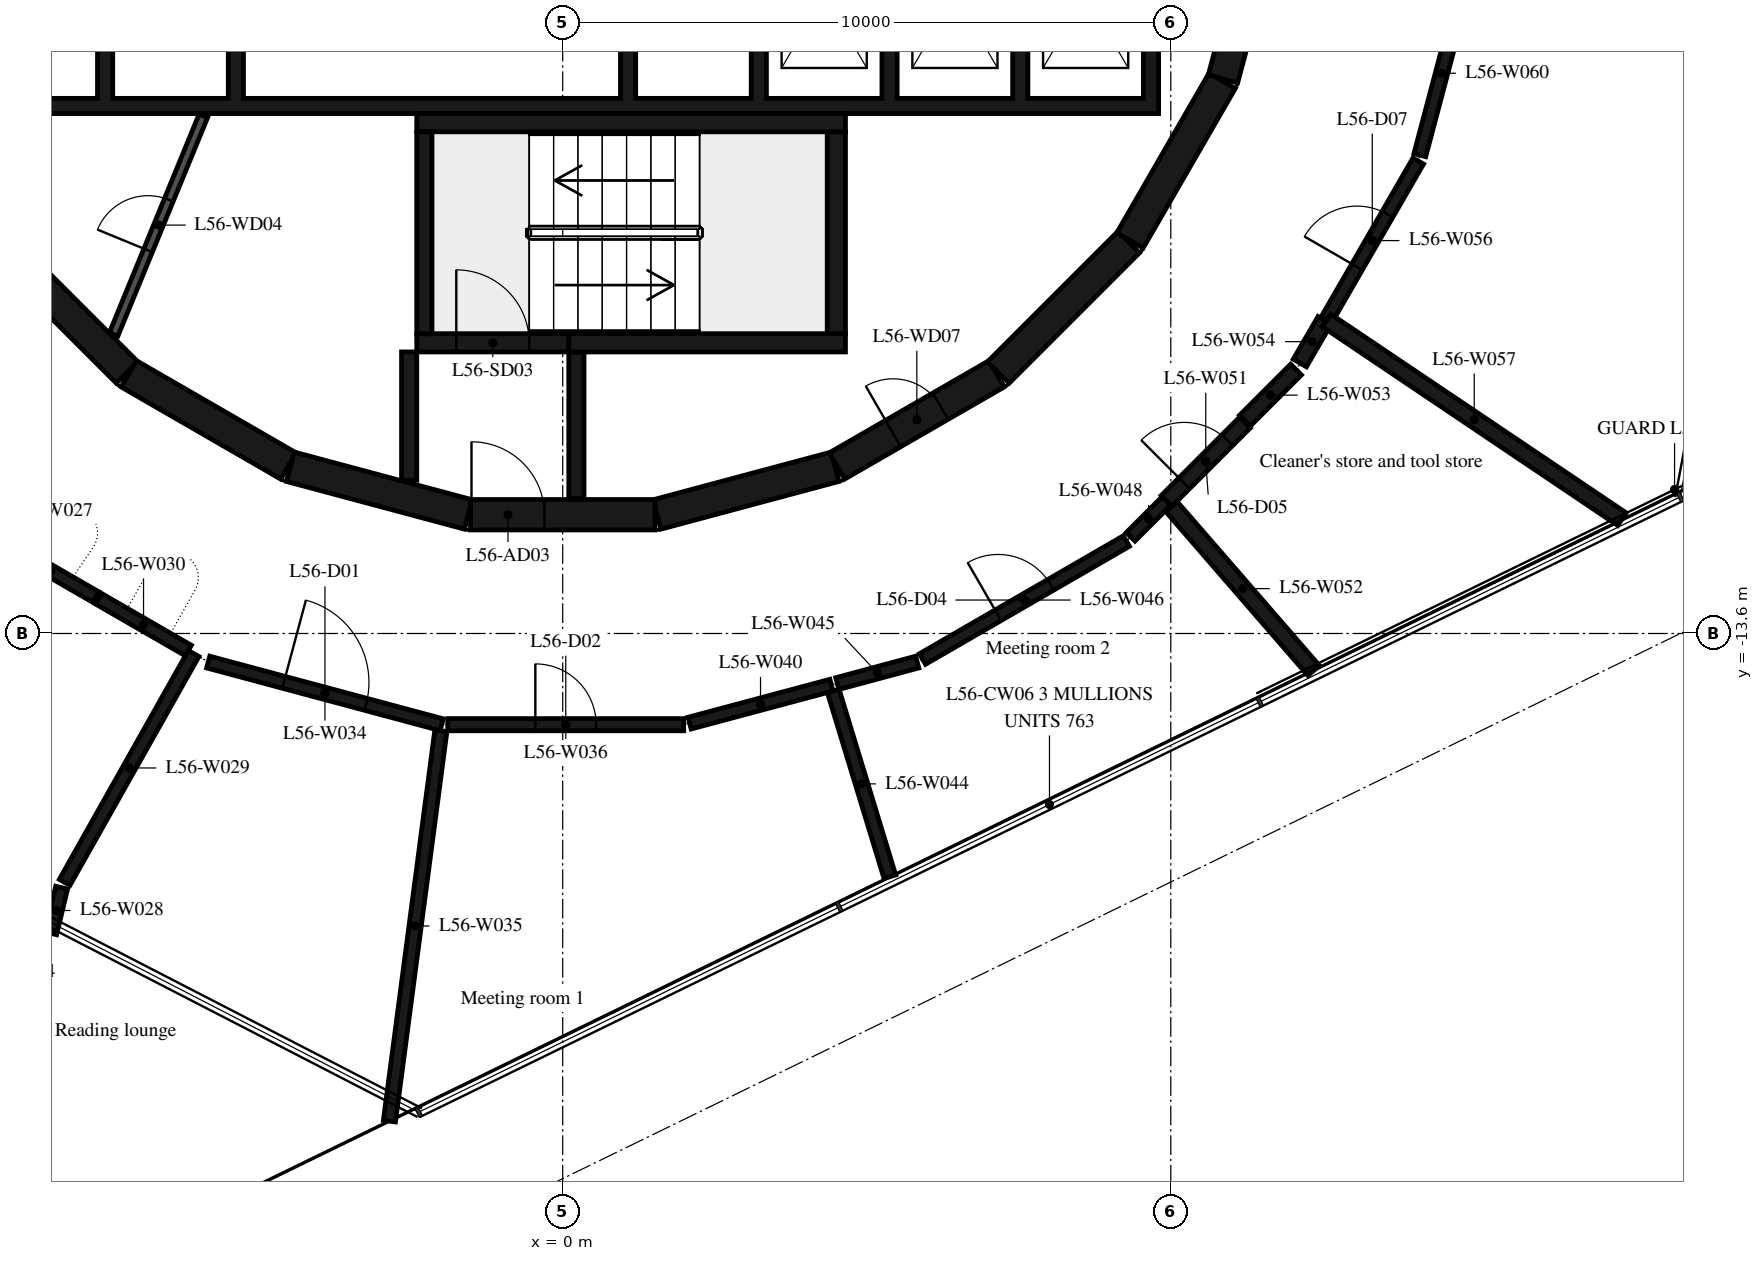
"""IFC4 building model, lengths in metres.
Left out: names, types, materials, properties, quantities, classifications, styles, units other than length and angle.
Written with IfcOpenShell. Run it as: python <this file> out.ifc"""

import sys

from ifc_helpers import new_model, si_unit, direction, frame, frame_2d, origin, place, context, subcontext, project, spatial, polyline, rectangle, outline, extrude, element, fill, save


model = new_model("IFC4")
c1 = context("Model", 3, precision=1e-05, world=origin(), true_north=direction((0.0, 1.0)))
c2 = subcontext(c1, "Body", "Model", "MODEL_VIEW")
j1 = project(units=[si_unit("LENGTHUNIT", "METRE"), si_unit("PLANEANGLEUNIT", "RADIAN")], contexts=[c1])
p1 = place(None, origin())
s1 = spatial("IfcSite", under=j1, at=p1, CompositionType="ELEMENT")
p2 = place(p1, origin())
s2 = spatial("IfcBuilding", under=s1, at=p2, CompositionType="ELEMENT")
p3 = place(p2, frame((0.0, 0.0, 219.9)))
s3 = spatial("IfcBuildingStorey", under=s2, at=p3, CompositionType="ELEMENT", Elevation=219.9)
p4 = place(p3, frame((1.55, -11.643, 0.0), z_axis=(0.0, 0.0, 1.0), x_axis=(0.965948410781, 0.258734743916, 0.0)))
e1 = element("IfcWall", 1, at=p4, inside=s3, PredefinedType="SHEAR", context=c2, shape_type="SweptSolid", body=[
    extrude(rectangle(XDim=3.033, YDim=0.5, at=frame_2d((1.516, 0.0))), origin(), (0.0, 0.0, 1.0), 6.35),
])
p5 = place(p3, frame((4.51, -10.845, 0.0), z_axis=(0.0, 0.0, 1.0), x_axis=(0.865975092491, 0.500087131594, 0.0)))
e2 = element("IfcWall", 2, at=p5, inside=s3, PredefinedType="SHEAR", context=c2, shape_type="SweptSolid", body=[
    extrude(rectangle(XDim=3.033, YDim=0.5, at=frame_2d((1.516, 0.0))), origin(), (0.0, 0.0, 1.0), 6.35),
])
p6 = place(p5, frame((1.066, 0.0, 0.0)))
e3 = element("IfcOpeningElement", 3, at=p6, cuts=e2, PredefinedType="OPENING", context=c2, shape_type="SweptSolid", body=[
    extrude(rectangle(XDim=0.9, YDim=2.1, at=frame_2d((0.45, 1.05))), frame((0.0, 0.26, 0.0), z_axis=(0.0, -1.0, 0.0), x_axis=(1.0, 0.0, 0.0)), (0.0, 0.0, 1.0), 0.52),
])
p7 = place(p3, frame((7.164, -9.308, 0.0), z_axis=(0.0, 0.0, 1.0), x_axis=(0.707106781187, 0.707106781187, 0.0)))
e4 = element("IfcWall", 4, at=p7, inside=s3, PredefinedType="SHEAR", context=c2, shape_type="SweptSolid", body=[
    extrude(rectangle(XDim=3.032, YDim=0.5, at=frame_2d((1.516, 0.0))), origin(), (0.0, 0.0, 1.0), 6.35),
])
for number, where, z_axis, x_axis in (
    (5, (9.329, -7.137, 0.0), (0.0, 0.0, 1.0), (0.5, 0.866, 0.0)),
    (6, (10.858, -4.479, 0.0), (0.0, 0.0, 1.0), (0.259, 0.966, 0.0)),
):
    element("IfcWall", number, at=place(p3, frame(where, z_axis=z_axis, x_axis=x_axis)), inside=s3, PredefinedType="SHEAR", context=c2, shape_type="SweptSolid", body=[
        extrude(rectangle(XDim=3.033, YDim=0.5, at=frame_2d((1.516, 0.0))), origin(), (0.0, 0.0, 1.0), 6.35),
    ])
p8 = place(p3, frame((-9.308, -7.164, 0.0), z_axis=(0.0, 0.0, 1.0), x_axis=(0.707106781187, -0.707106781187, 0.0)))
e7 = element("IfcWall", 7, at=p8, inside=s3, PredefinedType="SHEAR", context=c2, shape_type="SweptSolid", body=[
    extrude(rectangle(XDim=3.032, YDim=0.5, at=frame_2d((1.516, 0.0))), origin(), (0.0, 0.0, 1.0), 6.35),
])
for number, where, z_axis, x_axis in (
    (8, (-7.137, -9.329, 0.0), (0.0, 0.0, 1.0), (0.866, -0.5, 0.0)),
    (9, (-4.479, -10.858, 0.0), (0.0, 0.0, 1.0), (0.966, -0.259, 0.0)),
):
    element("IfcWall", number, at=place(p3, frame(where, z_axis=z_axis, x_axis=x_axis)), inside=s3, PredefinedType="SHEAR", context=c2, shape_type="SweptSolid", body=[
        extrude(rectangle(XDim=3.033, YDim=0.5, at=frame_2d((1.516, 0.0))), origin(), (0.0, 0.0, 1.0), 6.35),
    ])
p9 = place(p3, frame((-1.516, -11.647, 0.0), z_axis=(0.0, 0.0, 1.0), x_axis=(1.0, 0.0, 0.0)))
e10 = element("IfcWall", 10, at=p9, inside=s3, PredefinedType="SHEAR", context=c2, shape_type="SweptSolid", body=[
    extrude(rectangle(XDim=3.033, YDim=0.5, at=frame_2d((1.516, 0.0))), origin(), (0.0, 0.0, 1.0), 6.35),
])
p10 = place(p9, frame((0.016, 0.0, 0.0)))
e11 = element("IfcOpeningElement", 11, at=p10, cuts=e10, PredefinedType="OPENING", context=c2, shape_type="SweptSolid", body=[
    extrude(rectangle(XDim=1.2, YDim=2.1, at=frame_2d((0.6, 1.05))), frame((0.0, 0.26, 0.0), z_axis=(0.0, -1.0, 0.0), x_axis=(1.0, 0.0, 0.0)), (0.0, 0.0, 1.0), 0.52),
])
p11 = place(p3, frame((-2.275, -8.67, 0.0), z_axis=(0.0, 0.0, 1.0), x_axis=(0.0, 1.0, 0.0)))
e12 = element("IfcWall", 12, at=p11, inside=s3, PredefinedType="SHEAR", context=c2, shape_type="SweptSolid", body=[
    extrude(rectangle(XDim=3.32, YDim=0.25, at=frame_2d((1.66, 0.0))), origin(), (0.0, 0.0, 1.0), 6.35),
])
p12 = place(p3, frame((-2.4, -5.2, 0.0), z_axis=(0.0, 0.0, 1.0), x_axis=(1.0, 0.0, 0.0)))
e13 = element("IfcWall", 13, at=p12, inside=s3, PredefinedType="SHEAR", context=c2, shape_type="SweptSolid", body=[
    extrude(rectangle(XDim=7.05, YDim=0.3, at=frame_2d((3.525, 0.0))), origin(), (0.0, 0.0, 1.0), 6.35),
])
p13 = place(p3, frame((4.5, -8.67, 0.0), z_axis=(0.0, 0.0, 1.0), x_axis=(0.0, 1.0, 0.0)))
e14 = element("IfcWall", 14, at=p13, inside=s3, PredefinedType="SHEAR", context=c2, shape_type="SweptSolid", body=[
    extrude(rectangle(XDim=3.32, YDim=0.3, at=frame_2d((1.66, 0.0))), origin(), (0.0, 0.0, 1.0), 6.35),
])
p14 = place(p3, frame((0.1, -8.82, 0.0), z_axis=(0.0, 0.0, 1.0), x_axis=(1.0, 0.0, 0.0)))
e15 = element("IfcWall", 15, at=p14, inside=s3, PredefinedType="SHEAR", context=c2, shape_type="SweptSolid", body=[
    extrude(rectangle(XDim=4.55, YDim=0.3, at=frame_2d((2.275, 0.0))), origin(), (0.0, 0.0, 1.0), 6.35),
])
p15 = place(p3, frame((-2.4, -8.82, 0.0), z_axis=(0.0, 0.0, 1.0), x_axis=(1.0, 0.0, 0.0)))
e16 = element("IfcWall", 16, at=p15, inside=s3, PredefinedType="SHEAR", context=c2, shape_type="SweptSolid", body=[
    extrude(rectangle(XDim=2.5, YDim=0.3, at=frame_2d((1.25, 0.0))), origin(), (0.0, 0.0, 1.0), 6.35),
])
p16 = place(p15, frame((0.65, 0.0, 0.0)))
e17 = element("IfcOpeningElement", 17, at=p16, cuts=e16, PredefinedType="OPENING", context=c2, shape_type="SweptSolid", body=[
    extrude(rectangle(XDim=1.2, YDim=2.1, at=frame_2d((0.6, 1.05))), frame((0.0, 0.16, 0.0), z_axis=(0.0, -1.0, 0.0), x_axis=(1.0, 0.0, 0.0)), (0.0, 0.0, 1.0), 0.32),
])
p17 = place(p3, frame((-2.525, -8.97, 0.0), z_axis=(0.0, 0.0, 1.0), x_axis=(0.0, -1.0, 0.0)))
e18 = element("IfcWall", 18, at=p17, inside=s3, PredefinedType="SHEAR", context=c2, shape_type="SweptSolid", body=[
    extrude(rectangle(XDim=2.11, YDim=0.25, at=frame_2d((1.055, 0.0))), origin(), (0.0, 0.0, 1.0), 6.35),
])
p18 = place(p3, frame((0.225, -8.97, 0.0), z_axis=(0.0, 0.0, 1.0), x_axis=(0.0, -1.0, 0.0)))
e19 = element("IfcWall", 19, at=p18, inside=s3, PredefinedType="SHEAR", context=c2, shape_type="SweptSolid", body=[
    extrude(rectangle(XDim=2.41, YDim=0.25, at=frame_2d((1.205, 0.0))), origin(), (0.0, 0.0, 1.0), 6.35),
])
p19 = place(p3, origin())
e20 = element("IfcWall", 20, at=p19, inside=s3, PredefinedType="SHEAR", context=c2, shape_type="SweptSolid", body=[
    extrude(outline(polyline([(9.8, -5.05), (9.8, -4.8), (9.8, -1.9), (9.55, -1.9), (9.55, -4.8), (7.65, -4.8), (7.65, -1.9), (7.4, -1.9), (7.4, -4.8), (5.5, -4.8), (5.5, -1.9), (5.25, -1.9), (5.25, -4.8), (3.35, -4.8), (3.35, -1.9), (3.1, -1.9), (3.1, -4.8), (1.2, -4.8), (1.2, -1.9), (0.95, -1.9), (0.95, -4.8), (-5.25, -4.8), (-5.25, -1.9), (-5.5, -1.9), (-5.5, -4.8), (-7.4, -4.8), (-7.4, -1.9), (-7.65, -1.9), (-7.65, -4.8), (-9.55, -4.8), (-9.55, -1.9), (-9.8, -1.9), (-9.8, -4.8), (-9.8, -5.05), (9.8, -5.05)])), origin(), (0.0, 0.0, 1.0), 6.35),
])
p20 = place(p3, frame((-7.385, -8.681, 0.0), z_axis=(0.0, 0.0, 1.0), x_axis=(0.379804590409, 0.925066739811, 0.0)))
e21 = element("IfcWall", 21, at=p20, inside=s3, PredefinedType="PARTITIONING", context=c2, shape_type="SweptSolid", body=[
    extrude(rectangle(XDim=3.885, YDim=0.15, at=frame_2d((1.942, 0.0))), origin(), (0.0, 0.0, 1.0), 6.35),
])
p21 = place(p20, frame((1.493, 0.0, 0.0)))
e22 = element("IfcOpeningElement", 22, at=p21, cuts=e21, PredefinedType="OPENING", context=c2, shape_type="SweptSolid", body=[
    extrude(rectangle(XDim=0.9, YDim=2.1, at=frame_2d((0.45, 1.05))), frame((0.0, 0.085, 0.0), z_axis=(0.0, -1.0, 0.0), x_axis=(1.0, 0.0, 0.0)), (0.0, 0.0, 1.0), 0.17),
])
p22 = place(p3, frame((-9.153, -12.15, 0.0), z_axis=(0.0, 0.0, 1.0), x_axis=(0.866168859652, -0.49975144479, 0.0)))
e23 = element("IfcWall", 23, at=p22, inside=s3, PredefinedType="PARTITIONING", context=c2, shape_type="SweptSolid", body=[
    extrude(rectangle(XDim=1.701, YDim=0.2, at=frame_2d((0.851, 0.0))), origin(), (0.0, 0.0, 1.0), 6.35),
])
p23 = place(p3, frame((-8.42, -18.53, 0.0), z_axis=(0.0, 0.0, 1.0), x_axis=(0.233289147823, 0.972407411278, 0.0)))
e24 = element("IfcWall", 24, at=p23, inside=s3, PredefinedType="PARTITIONING", context=c2, shape_type="SweptSolid", body=[
    extrude(rectangle(XDim=0.771, YDim=0.2, at=frame_2d((0.386, 0.0))), origin(), (0.0, 0.0, 1.0), 6.35),
])
p24 = place(p3, frame((-8.191, -17.693, 0.0), z_axis=(0.0, 0.0, 1.0), x_axis=(0.490999025193, 0.871160121481, 0.0)))
e25 = element("IfcWall", 25, at=p24, inside=s3, PredefinedType="PARTITIONING", context=c2, shape_type="SweptSolid", body=[
    extrude(rectangle(XDim=4.319, YDim=0.2, at=frame_2d((2.16, 0.0))), origin(), (0.0, 0.0, 1.0), 6.35),
])
p25 = place(p3, frame((-7.63, -13.03, 0.0), z_axis=(0.0, 0.0, 1.0), x_axis=(0.866133007568, -0.499813578448, 0.0)))
e26 = element("IfcWall", 26, at=p25, inside=s3, PredefinedType="PARTITIONING", context=c2, shape_type="SweptSolid", body=[
    extrude(rectangle(XDim=1.701, YDim=0.2, at=frame_2d((0.851, 0.0))), origin(), (0.0, 0.0, 1.0), 6.35),
])
p26 = place(p3, frame((-5.83, -14.07, 0.0), z_axis=(0.0, 0.0, 1.0), x_axis=(0.965857829358, -0.259072679895, 0.0)))
e27 = element("IfcWall", 27, at=p26, inside=s3, PredefinedType="PARTITIONING", context=c2, shape_type="SweptSolid", body=[
    extrude(rectangle(XDim=3.976, YDim=0.2, at=frame_2d((1.988, 0.0))), origin(), (0.0, 0.0, 1.0), 6.35),
])
p27 = place(p26, frame((1.288, 0.0, 0.0)))
e28 = element("IfcOpeningElement", 28, at=p27, cuts=e27, PredefinedType="OPENING", context=c2, shape_type="SweptSolid", body=[
    extrude(rectangle(XDim=1.4, YDim=2.1, at=frame_2d((0.7, 1.05))), frame((0.0, 0.11, 0.0), z_axis=(0.0, -1.0, 0.0), x_axis=(1.0, 0.0, 0.0)), (0.0, 0.0, 1.0), 0.22),
])
p28 = place(p3, frame((-2.003, -15.199, 0.0), z_axis=(0.0, 0.0, 1.0), x_axis=(-0.130768496526, -0.991412931284, 0.0)))
e29 = element("IfcWall", 29, at=p28, inside=s3, PredefinedType="PARTITIONING", context=c2, shape_type="SweptSolid", body=[
    extrude(rectangle(XDim=6.477, YDim=0.2, at=frame_2d((3.238, 0.0))), origin(), (0.0, 0.0, 1.0), 6.35),
])
p29 = place(p3, frame((-1.89, -15.1, 0.0), z_axis=(0.0, 0.0, 1.0), x_axis=(1.0, 0.0, 0.0)))
e30 = element("IfcWall", 30, at=p29, inside=s3, PredefinedType="PARTITIONING", context=c2, shape_type="SweptSolid", body=[
    extrude(rectangle(XDim=3.88, YDim=0.2, at=frame_2d((1.94, 0.0))), origin(), (0.0, 0.0, 1.0), 6.35),
])
p30 = place(p29, frame((1.44, 0.0, 0.0)))
e31 = element("IfcOpeningElement", 31, at=p30, cuts=e30, PredefinedType="OPENING", context=c2, shape_type="SweptSolid", body=[
    extrude(rectangle(XDim=1.0, YDim=2.1, at=frame_2d((0.5, 1.05))), frame((0.0, 0.11, 0.0), z_axis=(0.0, -1.0, 0.0), x_axis=(1.0, 0.0, 0.0)), (0.0, 0.0, 1.0), 0.22),
])
p31 = place(p3, frame((2.087, -15.074, 0.0), z_axis=(0.0, 0.0, 1.0), x_axis=(0.966021544359, 0.258461555815, 0.0)))
e32 = element("IfcWall", 32, at=p31, inside=s3, PredefinedType="PARTITIONING", context=c2, shape_type="SweptSolid", body=[
    extrude(rectangle(XDim=2.415, YDim=0.2, at=frame_2d((1.208, 0.0))), origin(), (0.0, 0.0, 1.0), 6.35),
])
p32 = place(p3, frame((4.449, -14.546, 0.0), z_axis=(0.0, 0.0, 1.0), x_axis=(0.291462808619, -0.956582161235, 0.0)))
e33 = element("IfcWall", 33, at=p32, inside=s3, PredefinedType="PARTITIONING", context=c2, shape_type="SweptSolid", body=[
    extrude(rectangle(XDim=3.193, YDim=0.2, at=frame_2d((1.597, 0.0))), origin(), (0.0, 0.0, 1.0), 6.35),
])
p33 = place(p3, frame((4.517, -14.424, 0.0), z_axis=(0.0, 0.0, 1.0), x_axis=(0.965546411807, 0.260230910245, 0.0)))
e34 = element("IfcWall", 34, at=p33, inside=s3, PredefinedType="PARTITIONING", context=c2, shape_type="SweptSolid", body=[
    extrude(rectangle(XDim=1.36, YDim=0.2, at=frame_2d((0.68, 0.0))), origin(), (0.0, 0.0, 1.0), 6.35),
])
p34 = place(p3, frame((5.917, -14.02, 0.0), z_axis=(0.0, 0.0, 1.0), x_axis=(0.865601686425, 0.500733182901, 0.0)))
e35 = element("IfcWall", 35, at=p34, inside=s3, PredefinedType="PARTITIONING", context=c2, shape_type="SweptSolid", body=[
    extrude(rectangle(XDim=3.874, YDim=0.2, at=frame_2d((1.937, 0.0))), origin(), (0.0, 0.0, 1.0), 6.35),
])
p35 = place(p34, frame((1.437, 0.0, 0.0)))
e36 = element("IfcOpeningElement", 36, at=p35, cuts=e35, PredefinedType="OPENING", context=c2, shape_type="SweptSolid", body=[
    extrude(rectangle(XDim=1.0, YDim=2.1, at=frame_2d((0.5, 1.05))), frame((0.0, 0.11, 0.0), z_axis=(0.0, -1.0, 0.0), x_axis=(1.0, 0.0, 0.0)), (0.0, 0.0, 1.0), 0.22),
])
p36 = place(p3, frame((9.341, -12.009, 0.0), z_axis=(0.0, 0.0, 1.0), x_axis=(0.706960276109, 0.707253255916, 0.0)))
e37 = element("IfcWall", 37, at=p36, inside=s3, PredefinedType="PARTITIONING", context=c2, shape_type="SweptSolid", body=[
    extrude(rectangle(XDim=0.833, YDim=0.2, at=frame_2d((0.417, 0.0))), origin(), (0.0, 0.0, 1.0), 6.35),
])
p37 = place(p3, frame((9.93, -11.42, 0.0), z_axis=(0.0, 0.0, 1.0), x_axis=(0.707106781187, 0.707106781187, 0.0)))
e38 = element("IfcWall", 38, at=p37, inside=s3, PredefinedType="PARTITIONING", context=c2, shape_type="SweptSolid", body=[
    extrude(rectangle(XDim=1.824, YDim=0.25, at=frame_2d((0.912, 0.0))), origin(), (0.0, 0.0, 1.0), 6.35),
])
p38 = place(p37, frame((0.412, 0.0, 0.0)))
e39 = element("IfcOpeningElement", 39, at=p38, cuts=e38, PredefinedType="OPENING", context=c2, shape_type="SweptSolid", body=[
    extrude(rectangle(XDim=1.0, YDim=2.1, at=frame_2d((0.5, 1.05))), frame((0.0, 0.135, 0.0), z_axis=(0.0, -1.0, 0.0), x_axis=(1.0, 0.0, 0.0)), (0.0, 0.0, 1.0), 0.27),
])
p39 = place(p3, frame((10.012, -11.514, 0.0), z_axis=(0.0, 0.0, 1.0), x_axis=(0.655248263948, -0.755413603659, 0.0)))
e40 = element("IfcWall", 40, at=p39, inside=s3, PredefinedType="PARTITIONING", context=c2, shape_type="SweptSolid", body=[
    extrude(rectangle(XDim=3.568, YDim=0.25, at=frame_2d((1.784, 0.0))), origin(), (0.0, 0.0, 1.0), 6.35),
])
p40 = place(p3, frame((11.22, -10.1, 0.0), z_axis=(0.0, 0.0, 1.0), x_axis=(0.707106781187, 0.707106781187, 0.0)))
e41 = element("IfcWall", 41, at=p40, inside=s3, PredefinedType="PARTITIONING", context=c2, shape_type="SweptSolid", body=[
    extrude(rectangle(XDim=1.188, YDim=0.25, at=frame_2d((0.594, 0.0))), origin(), (0.0, 0.0, 1.0), 6.35),
])
p41 = place(p3, frame((12.123, -9.152, 0.0), z_axis=(0.0, 0.0, 1.0), x_axis=(0.501830648268, 0.864965895546, 0.0)))
e42 = element("IfcWall", 42, at=p41, inside=s3, PredefinedType="PARTITIONING", context=c2, shape_type="SweptSolid", body=[
    extrude(rectangle(XDim=0.812, YDim=0.25, at=frame_2d((0.406, 0.0))), origin(), (0.0, 0.0, 1.0), 6.35),
])
p42 = place(p3, frame((12.557, -8.447, 0.0), z_axis=(0.0, 0.0, 1.0), x_axis=(0.500412148236, 0.865787319091, 0.0)))
e43 = element("IfcWall", 43, at=p42, inside=s3, PredefinedType="PARTITIONING", context=c2, shape_type="SweptSolid", body=[
    extrude(rectangle(XDim=3.023, YDim=0.2, at=frame_2d((1.511, 0.0))), origin(), (0.0, 0.0, 1.0), 6.35),
])
p43 = place(p42, frame((1.011, 0.0, 0.0)))
e44 = element("IfcOpeningElement", 44, at=p43, cuts=e43, PredefinedType="OPENING", context=c2, shape_type="SweptSolid", body=[
    extrude(rectangle(XDim=1.0, YDim=2.1, at=frame_2d((0.5, 1.05))), frame((0.0, 0.11, 0.0), z_axis=(0.0, -1.0, 0.0), x_axis=(1.0, 0.0, 0.0)), (0.0, 0.0, 1.0), 0.22),
])
p44 = place(p3, frame((12.56, -8.45, 0.0), z_axis=(0.0, 0.0, 1.0), x_axis=(0.829670163867, -0.558253902081, 0.0)))
e45 = element("IfcWall", 45, at=p44, inside=s3, PredefinedType="PARTITIONING", context=c2, shape_type="SweptSolid", body=[
    extrude(rectangle(XDim=5.858, YDim=0.25, at=frame_2d((2.929, 0.0))), origin(), (0.0, 0.0, 1.0), 6.35),
])
p45 = place(p3, frame((14.096, -5.733, 0.0), z_axis=(0.0, 0.0, 1.0), x_axis=(0.256364537332, 0.966580169463, 0.0)))
e46 = element("IfcWall", 46, at=p45, inside=s3, PredefinedType="PARTITIONING", context=c2, shape_type="SweptSolid", body=[
    extrude(rectangle(XDim=2.786, YDim=0.2, at=frame_2d((1.393, 0.0))), origin(), (0.0, 0.0, 1.0), 6.35),
])
p46 = place(p16, origin())
e47 = element("IfcDoor", 47, at=p46, inside=s3, OperationType="SINGLE_SWING_LEFT", PredefinedType="DOOR", context=c2, shape_type="SweptSolid", body=[
    extrude(rectangle(XDim=1.2, YDim=2.1, at=frame_2d((0.6, 1.05))), frame((0.0, 0.025, 0.0), z_axis=(0.0, -1.0, 0.0), x_axis=(1.0, 0.0, 0.0)), (0.0, 0.0, 1.0), 0.05),
])
fill(e17, e47)
p47 = place(p10, origin())
e48 = element("IfcDoor", 48, at=p47, inside=s3, OperationType="SINGLE_SWING_RIGHT", PredefinedType="DOOR", context=c2, shape_type="SweptSolid", body=[
    extrude(rectangle(XDim=1.2, YDim=2.1, at=frame_2d((0.6, 1.05))), frame((0.0, 0.025, 0.0), z_axis=(0.0, -1.0, 0.0), x_axis=(1.0, 0.0, 0.0)), (0.0, 0.0, 1.0), 0.05),
])
fill(e11, e48)
p48 = place(p21, origin())
e49 = element("IfcDoor", 49, at=p48, inside=s3, OperationType="SINGLE_SWING_RIGHT", PredefinedType="DOOR", context=c2, shape_type="SweptSolid", body=[
    extrude(rectangle(XDim=0.9, YDim=2.1, at=frame_2d((0.45, 1.05))), frame((0.0, 0.025, 0.0), z_axis=(0.0, -1.0, 0.0), x_axis=(1.0, 0.0, 0.0)), (0.0, 0.0, 1.0), 0.05),
])
fill(e22, e49)
p49 = place(p6, origin())
e50 = element("IfcDoor", 50, at=p49, inside=s3, OperationType="SINGLE_SWING_LEFT", PredefinedType="DOOR", context=c2, shape_type="SweptSolid", body=[
    extrude(rectangle(XDim=0.9, YDim=2.1, at=frame_2d((0.45, 1.05))), frame((0.0, 0.025, 0.0), z_axis=(0.0, -1.0, 0.0), x_axis=(1.0, 0.0, 0.0)), (0.0, 0.0, 1.0), 0.05),
])
fill(e3, e50)
p50 = place(p27, origin())
e51 = element("IfcDoor", 51, at=p50, inside=s3, OperationType="DOUBLE_DOOR_SINGLE_SWING", PredefinedType="DOOR", context=c2, shape_type="SweptSolid", body=[
    extrude(rectangle(XDim=1.4, YDim=2.1, at=frame_2d((0.7, 1.05))), frame((0.0, 0.025, 0.0), z_axis=(0.0, -1.0, 0.0), x_axis=(1.0, 0.0, 0.0)), (0.0, 0.0, 1.0), 0.05),
])
fill(e28, e51)
p51 = place(p30, origin())
e52 = element("IfcDoor", 52, at=p51, inside=s3, OperationType="SINGLE_SWING_LEFT", PredefinedType="DOOR", context=c2, shape_type="SweptSolid", body=[
    extrude(rectangle(XDim=1.0, YDim=2.1, at=frame_2d((0.5, 1.05))), frame((0.0, 0.025, 0.0), z_axis=(0.0, -1.0, 0.0), x_axis=(1.0, 0.0, 0.0)), (0.0, 0.0, 1.0), 0.05),
])
fill(e31, e52)
p52 = place(p35, origin())
e53 = element("IfcDoor", 53, at=p52, inside=s3, OperationType="SINGLE_SWING_LEFT", PredefinedType="DOOR", context=c2, shape_type="SweptSolid", body=[
    extrude(rectangle(XDim=1.0, YDim=2.1, at=frame_2d((0.5, 1.05))), frame((0.0, 0.025, 0.0), z_axis=(0.0, -1.0, 0.0), x_axis=(1.0, 0.0, 0.0)), (0.0, 0.0, 1.0), 0.05),
])
fill(e36, e53)
p53 = place(p38, origin())
e54 = element("IfcDoor", 54, at=p53, inside=s3, OperationType="SINGLE_SWING_LEFT", PredefinedType="DOOR", context=c2, shape_type="SweptSolid", body=[
    extrude(rectangle(XDim=1.0, YDim=2.1, at=frame_2d((0.5, 1.05))), frame((0.0, 0.025, 0.0), z_axis=(0.0, -1.0, 0.0), x_axis=(1.0, 0.0, 0.0)), (0.0, 0.0, 1.0), 0.05),
])
fill(e39, e54)
p54 = place(p43, origin())
e55 = element("IfcDoor", 55, at=p54, inside=s3, OperationType="SINGLE_SWING_LEFT", PredefinedType="DOOR", context=c2, shape_type="SweptSolid", body=[
    extrude(rectangle(XDim=1.0, YDim=2.1, at=frame_2d((0.5, 1.05))), frame((0.0, 0.025, 0.0), z_axis=(0.0, -1.0, 0.0), x_axis=(1.0, 0.0, 0.0)), (0.0, 0.0, 1.0), 0.05),
])
fill(e44, e55)
save(model, sys.argv[1])
